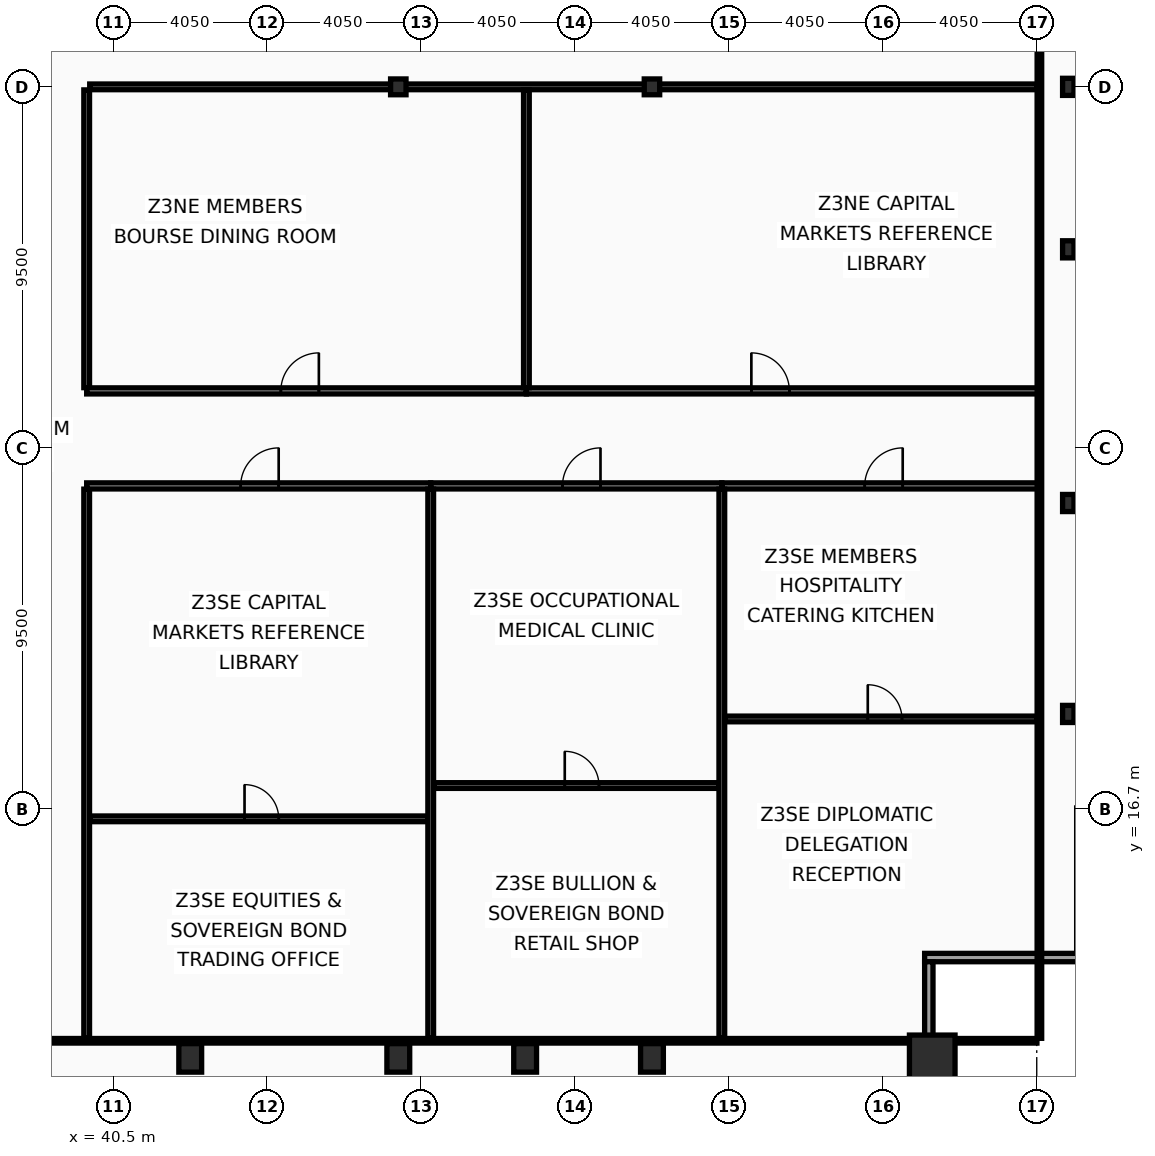
"""IFC4 building model, lengths in metres.
Left out: names, types, materials, properties, quantities, classifications, styles, units other than length and angle.
Written with IfcOpenShell. Run it as: python <this file> out.ifc"""

import sys

from ifc_helpers import new_model, si_unit, direction, frame, frame_2d, origin, origin_2d, place, context, subcontext, project, spatial, rectangle, hollow_rectangle, i_section, extrude, element, fill, save


model = new_model("IFC4")
c1 = context("Model", 3, precision=1e-05, world=origin(), true_north=direction((0.0, 1.0)))
c2 = subcontext(c1, "Body", "Model", "MODEL_VIEW")
j1 = project(units=[si_unit("LENGTHUNIT", "METRE"), si_unit("PLANEANGLEUNIT", "RADIAN")], contexts=[c1])
p1 = place(None, origin())
s1 = spatial("IfcSite", under=j1, at=p1, CompositionType="ELEMENT")
p2 = place(p1, origin())
s2 = spatial("IfcBuilding", under=s1, at=p2, CompositionType="ELEMENT")
p3 = place(p2, frame((0.0, 0.0, 228.2)))
s3 = spatial("IfcBuildingStorey", under=s2, at=p3, CompositionType="ELEMENT", Elevation=228.2)
p4 = place(p3, frame((62.05, 10.15, 0.0), z_axis=(0.0, 0.0, 1.0), x_axis=(1.0, 0.0, 0.0)))
e1 = element("IfcColumn", 1, at=p4, inside=s3, PredefinedType="COLUMN", context=c2, shape_type="SweptSolid", body=[
    extrude(hollow_rectangle(XDim=1.2, YDim=1.2, WallThickness=0.06, at=origin_2d()), origin(), (0.0, 0.0, 1.0), 3.6),
])
for number, where, z_axis, x_axis in (
    (2, (42.525, 10.15, 0.0), (0.0, 0.0, 1.0), (1.0, 0.0, 0.0)),
    (3, (48.0, 10.15, 0.0), (0.0, 0.0, 1.0), (1.0, 0.0, 0.0)),
    (4, (51.337, 10.15, 0.0), (0.0, 0.0, 1.0), (1.0, 0.0, 0.0)),
    (5, (54.675, 10.15, 0.0), (0.0, 0.0, 1.0), (1.0, 0.0, 0.0)),
):
    element("IfcColumn", number, at=place(p3, frame(where, z_axis=z_axis, x_axis=x_axis)), inside=s3, PredefinedType="COLUMN", context=c2, shape_type="SweptSolid", body=[
        extrude(hollow_rectangle(XDim=0.6, YDim=0.75, WallThickness=0.045, at=origin_2d()), origin(), (0.0, 0.0, 1.0), 3.6),
    ])
for number, where, z_axis, x_axis in (
    (6, (65.63, 19.2, 0.0), (0.0, 0.0, 1.0), (1.0, 0.0, 0.0)),
    (7, (65.63, 24.75, 0.0), (0.0, 0.0, 1.0), (1.0, 0.0, 0.0)),
    (8, (65.63, 31.425, 0.0), (0.0, 0.0, 1.0), (1.0, 0.0, 0.0)),
    (9, (65.63, 35.7, 0.0), (0.0, 0.0, 1.0), (1.0, 0.0, 0.0)),
):
    element("IfcColumn", number, at=place(p3, frame(where, z_axis=z_axis, x_axis=x_axis)), inside=s3, PredefinedType="COLUMN", context=c2, shape_type="SweptSolid", body=[
        extrude(i_section(OverallWidth=0.3, OverallDepth=0.45, WebThickness=0.014, FlangeThickness=0.026, at=origin_2d()), origin(), (0.0, 0.0, 1.0), 3.6),
    ])
for number, where, z_axis, x_axis in (
    (10, (48.0, 35.7, 0.0), (0.0, 0.0, 1.0), (1.0, 0.0, 0.0)),
    (11, (54.675, 35.7, 0.0), (0.0, 0.0, 1.0), (1.0, 0.0, 0.0)),
):
    element("IfcColumn", number, at=place(p3, frame(where, z_axis=z_axis, x_axis=x_axis)), inside=s3, PredefinedType="COLUMN", context=c2, shape_type="SweptSolid", body=[
        extrude(i_section(OverallWidth=0.406, OverallDepth=0.416, WebThickness=0.03, FlangeThickness=0.048, at=origin_2d()), origin(), (0.0, 0.0, 1.0), 3.6),
    ])
p5 = place(p3, frame((66.07, 12.79, 0.0), z_axis=(0.0, 0.0, 1.0), x_axis=(-1.0, 0.0, 0.0)))
e12 = element("IfcWall", 12, at=p5, inside=s3, PredefinedType="SOLIDWALL", context=c2, shape_type="SweptSolid", body=[
    extrude(rectangle(XDim=4.22, YDim=0.22, at=frame_2d((2.11, 0.0))), origin(), (0.0, 0.0, 1.0), 2.83),
])
p6 = place(p3, frame((61.96, 12.68, 0.0), z_axis=(0.0, 0.0, 1.0), x_axis=(0.0, -1.0, 0.0)))
e13 = element("IfcWall", 13, at=p6, inside=s3, PredefinedType="SOLIDWALL", context=c2, shape_type="SweptSolid", body=[
    extrude(rectangle(XDim=3.91, YDim=0.22, at=frame_2d((1.955, 0.0))), origin(), (0.0, 0.0, 1.0), 2.83),
])
p7 = place(p3, frame((39.8, 10.665, 0.0), z_axis=(0.0, 0.0, 1.0), x_axis=(0.0, 1.0, 0.0)))
e14 = element("IfcWall", 14, at=p7, inside=s3, PredefinedType="PARTITIONING", context=c2, shape_type="SweptSolid", body=[
    extrude(rectangle(XDim=14.45, YDim=0.15, at=frame_2d((7.225, 0.0))), origin(), (0.0, 0.0, 1.0), 2.98),
])
p8 = place(p3, frame((39.8, 27.785, 0.0), z_axis=(0.0, 0.0, 1.0), x_axis=(0.0, 1.0, 0.0)))
e15 = element("IfcWall", 15, at=p8, inside=s3, PredefinedType="PARTITIONING", context=c2, shape_type="SweptSolid", body=[
    extrude(rectangle(XDim=7.835, YDim=0.15, at=frame_2d((3.917, 0.0))), origin(), (0.0, 0.0, 1.0), 2.98),
])
p9 = place(p3, frame((39.88, 35.7, 0.0), z_axis=(0.0, 0.0, 1.0), x_axis=(1.0, 0.0, 0.0)))
e16 = element("IfcWall", 16, at=p9, inside=s3, PredefinedType="PARTITIONING", context=c2, shape_type="SweptSolid", body=[
    extrude(rectangle(XDim=24.925, YDim=0.15, at=frame_2d((12.462, 0.0))), origin(), (0.0, 0.0, 1.0), 2.78),
])
p10 = place(p3, frame((39.8, 25.2, 0.0), z_axis=(0.0, 0.0, 1.0), x_axis=(1.0, 0.0, 0.0)))
e17 = element("IfcWall", 17, at=p10, inside=s3, PredefinedType="PARTITIONING", context=c2, shape_type="SweptSolid", body=[
    extrude(rectangle(XDim=9.053, YDim=0.16, at=frame_2d((4.526, 0.0))), origin(), (0.0, 0.0, 1.0), 2.78),
])
p11 = place(p10, frame((4.052, 0.0, 0.0)))
e18 = element("IfcOpeningElement", 18, at=p11, cuts=e17, PredefinedType="OPENING", context=c2, shape_type="SweptSolid", body=[
    extrude(rectangle(XDim=1.0, YDim=2.05, at=frame_2d((0.5, 1.025))), frame((0.0, 0.09, 0.0), z_axis=(0.0, -1.0, 0.0), x_axis=(1.0, 0.0, 0.0)), (0.0, 0.0, 1.0), 0.18),
])
p12 = place(p3, frame((39.88, 16.44, 0.0), z_axis=(0.0, 0.0, 1.0), x_axis=(1.0, 0.0, 0.0)))
e19 = element("IfcWall", 19, at=p12, inside=s3, PredefinedType="PARTITIONING", context=c2, shape_type="SweptSolid", body=[
    extrude(rectangle(XDim=8.893, YDim=0.15, at=frame_2d((4.447, 0.0))), origin(), (0.0, 0.0, 1.0), 2.78),
])
p13 = place(p12, frame((4.074, 0.0, 0.0)))
e20 = element("IfcOpeningElement", 20, at=p13, cuts=e19, PredefinedType="OPENING", context=c2, shape_type="SweptSolid", body=[
    extrude(rectangle(XDim=0.9, YDim=2.05, at=frame_2d((0.45, 1.025))), frame((0.0, 0.085, 0.0), z_axis=(0.0, -1.0, 0.0), x_axis=(1.0, 0.0, 0.0)), (0.0, 0.0, 1.0), 0.17),
])
p14 = place(p3, frame((48.853, 25.2, 0.0), z_axis=(0.0, 0.0, 1.0), x_axis=(1.0, 0.0, 0.0)))
e21 = element("IfcWall", 21, at=p14, inside=s3, PredefinedType="PARTITIONING", context=c2, shape_type="SweptSolid", body=[
    extrude(rectangle(XDim=7.66, YDim=0.16, at=frame_2d((3.83, 0.0))), origin(), (0.0, 0.0, 1.0), 2.78),
])
p15 = place(p14, frame((3.467, 0.0, 0.0)))
e22 = element("IfcOpeningElement", 22, at=p15, cuts=e21, PredefinedType="OPENING", context=c2, shape_type="SweptSolid", body=[
    extrude(rectangle(XDim=1.0, YDim=2.05, at=frame_2d((0.5, 1.025))), frame((0.0, 0.09, 0.0), z_axis=(0.0, -1.0, 0.0), x_axis=(1.0, 0.0, 0.0)), (0.0, 0.0, 1.0), 0.18),
])
p16 = place(p3, frame((48.853, 10.665, 0.0), z_axis=(0.0, 0.0, 1.0), x_axis=(0.0, 1.0, 0.0)))
e23 = element("IfcWall", 23, at=p16, inside=s3, PredefinedType="PARTITIONING", context=c2, shape_type="SweptSolid", body=[
    extrude(rectangle(XDim=14.45, YDim=0.15, at=frame_2d((7.225, 0.0))), origin(), (0.0, 0.0, 1.0), 2.98),
])
p17 = place(p3, frame((48.933, 17.316, 0.0), z_axis=(0.0, 0.0, 1.0), x_axis=(1.0, 0.0, 0.0)))
e24 = element("IfcWall", 24, at=p17, inside=s3, PredefinedType="PARTITIONING", context=c2, shape_type="SweptSolid", body=[
    extrude(rectangle(XDim=7.5, YDim=0.15, at=frame_2d((3.75, 0.0))), origin(), (0.0, 0.0, 1.0), 2.78),
])
p18 = place(p17, frame((3.447, 0.0, 0.0)))
e25 = element("IfcOpeningElement", 25, at=p18, cuts=e24, PredefinedType="OPENING", context=c2, shape_type="SweptSolid", body=[
    extrude(rectangle(XDim=0.9, YDim=2.05, at=frame_2d((0.45, 1.025))), frame((0.0, 0.085, 0.0), z_axis=(0.0, -1.0, 0.0), x_axis=(1.0, 0.0, 0.0)), (0.0, 0.0, 1.0), 0.17),
])
p19 = place(p3, frame((56.513, 25.2, 0.0), z_axis=(0.0, 0.0, 1.0), x_axis=(1.0, 0.0, 0.0)))
e26 = element("IfcWall", 26, at=p19, inside=s3, PredefinedType="PARTITIONING", context=c2, shape_type="SweptSolid", body=[
    extrude(rectangle(XDim=8.357, YDim=0.16, at=frame_2d((4.178, 0.0))), origin(), (0.0, 0.0, 1.0), 3.44),
])
p20 = place(p19, frame((3.76, 0.0, 0.0)))
e27 = element("IfcOpeningElement", 27, at=p20, cuts=e26, PredefinedType="OPENING", context=c2, shape_type="SweptSolid", body=[
    extrude(rectangle(XDim=1.0, YDim=2.05, at=frame_2d((0.5, 1.025))), frame((0.0, 0.09, 0.0), z_axis=(0.0, -1.0, 0.0), x_axis=(1.0, 0.0, 0.0)), (0.0, 0.0, 1.0), 0.18),
])
p21 = place(p3, frame((56.513, 10.665, 0.0), z_axis=(0.0, 0.0, 1.0), x_axis=(0.0, 1.0, 0.0)))
e28 = element("IfcWall", 28, at=p21, inside=s3, PredefinedType="PARTITIONING", context=c2, shape_type="SweptSolid", body=[
    extrude(rectangle(XDim=14.45, YDim=0.15, at=frame_2d((7.225, 0.0))), origin(), (0.0, 0.0, 1.0), 2.78),
])
p22 = place(p3, frame((56.593, 19.068, 0.0), z_axis=(0.0, 0.0, 1.0), x_axis=(1.0, 0.0, 0.0)))
e29 = element("IfcWall", 29, at=p22, inside=s3, PredefinedType="PARTITIONING", context=c2, shape_type="SweptSolid", body=[
    extrude(rectangle(XDim=8.212, YDim=0.15, at=frame_2d((4.106, 0.0))), origin(), (0.0, 0.0, 1.0), 2.78),
])
p23 = place(p22, frame((3.76, 0.0, 0.0)))
e30 = element("IfcOpeningElement", 30, at=p23, cuts=e29, PredefinedType="OPENING", context=c2, shape_type="SweptSolid", body=[
    extrude(rectangle(XDim=0.9, YDim=2.05, at=frame_2d((0.45, 1.025))), frame((0.0, 0.085, 0.0), z_axis=(0.0, -1.0, 0.0), x_axis=(1.0, 0.0, 0.0)), (0.0, 0.0, 1.0), 0.17),
])
p24 = place(p3, frame((39.8, 27.7, 0.0), z_axis=(0.0, 0.0, 1.0), x_axis=(1.0, 0.0, 0.0)))
e31 = element("IfcWall", 31, at=p24, inside=s3, PredefinedType="PARTITIONING", context=c2, shape_type="SweptSolid", body=[
    extrude(rectangle(XDim=11.571, YDim=0.16, at=frame_2d((5.785, 0.0))), origin(), (0.0, 0.0, 1.0), 2.78),
])
p25 = place(p24, frame((5.11, 0.0, 0.0)))
e32 = element("IfcOpeningElement", 32, at=p25, cuts=e31, PredefinedType="OPENING", context=c2, shape_type="SweptSolid", body=[
    extrude(rectangle(XDim=1.0, YDim=2.05, at=frame_2d((0.5, 1.025))), frame((0.0, 0.09, 0.0), z_axis=(0.0, -1.0, 0.0), x_axis=(1.0, 0.0, 0.0)), (0.0, 0.0, 1.0), 0.18),
])
p26 = place(p3, frame((51.371, 27.7, 0.0), z_axis=(0.0, 0.0, 1.0), x_axis=(1.0, 0.0, 0.0)))
e33 = element("IfcWall", 33, at=p26, inside=s3, PredefinedType="PARTITIONING", context=c2, shape_type="SweptSolid", body=[
    extrude(rectangle(XDim=13.499, YDim=0.16, at=frame_2d((6.75, 0.0))), origin(), (0.0, 0.0, 1.0), 2.78),
])
p27 = place(p26, frame((5.92, 0.0, 0.0)))
e34 = element("IfcOpeningElement", 34, at=p27, cuts=e33, PredefinedType="OPENING", context=c2, shape_type="SweptSolid", body=[
    extrude(rectangle(XDim=1.0, YDim=2.05, at=frame_2d((0.5, 1.025))), frame((0.0, 0.09, 0.0), z_axis=(0.0, -1.0, 0.0), x_axis=(1.0, 0.0, 0.0)), (0.0, 0.0, 1.0), 0.18),
])
p28 = place(p3, frame((51.371, 27.785, 0.0), z_axis=(0.0, 0.0, 1.0), x_axis=(0.0, 1.0, 0.0)))
e35 = element("IfcWall", 35, at=p28, inside=s3, PredefinedType="PARTITIONING", context=c2, shape_type="SweptSolid", body=[
    extrude(rectangle(XDim=7.835, YDim=0.15, at=frame_2d((3.917, 0.0))), origin(), (0.0, 0.0, 1.0), 2.98),
])
p29 = place(p3, frame((64.87, 10.665, 0.0), z_axis=(0.0, 0.0, 1.0), x_axis=(0.0, 1.0, 0.0)))
e36 = element("IfcWall", 36, at=p29, inside=s3, PredefinedType="PARTITIONING", context=c2, shape_type="SweptSolid", body=[
    extrude(rectangle(XDim=42.11, YDim=0.12, at=frame_2d((21.055, 0.0))), origin(), (0.0, 0.0, 1.0), 2.78),
])
p30 = place(p3, frame((8.095, 10.6, 0.0), z_axis=(0.0, 0.0, 1.0), x_axis=(1.0, 0.0, 0.0)))
e37 = element("IfcWall", 37, at=p30, inside=s3, PredefinedType="PARTITIONING", context=c2, shape_type="SweptSolid", body=[
    extrude(rectangle(XDim=56.71, YDim=0.12, at=frame_2d((28.355, 0.0))), origin(), (0.0, 0.0, 1.0), 2.78),
])
p31 = place(p11, origin())
e38 = element("IfcDoor", 38, at=p31, inside=s3, OperationType="SINGLE_SWING_RIGHT", PredefinedType="DOOR", context=c2, shape_type="SweptSolid", body=[
    extrude(rectangle(XDim=1.0, YDim=2.05, at=frame_2d((0.5, 1.025))), frame((0.0, 0.025, 0.0), z_axis=(0.0, -1.0, 0.0), x_axis=(1.0, 0.0, 0.0)), (0.0, 0.0, 1.0), 0.05),
])
fill(e18, e38)
p32 = place(p13, origin())
e39 = element("IfcDoor", 39, at=p32, inside=s3, OperationType="SINGLE_SWING_LEFT", PredefinedType="DOOR", context=c2, shape_type="SweptSolid", body=[
    extrude(rectangle(XDim=0.9, YDim=2.05, at=frame_2d((0.45, 1.025))), frame((0.0, 0.025, 0.0), z_axis=(0.0, -1.0, 0.0), x_axis=(1.0, 0.0, 0.0)), (0.0, 0.0, 1.0), 0.05),
])
fill(e20, e39)
p33 = place(p15, origin())
e40 = element("IfcDoor", 40, at=p33, inside=s3, OperationType="SINGLE_SWING_RIGHT", PredefinedType="DOOR", context=c2, shape_type="SweptSolid", body=[
    extrude(rectangle(XDim=1.0, YDim=2.05, at=frame_2d((0.5, 1.025))), frame((0.0, 0.025, 0.0), z_axis=(0.0, -1.0, 0.0), x_axis=(1.0, 0.0, 0.0)), (0.0, 0.0, 1.0), 0.05),
])
fill(e22, e40)
p34 = place(p18, origin())
e41 = element("IfcDoor", 41, at=p34, inside=s3, OperationType="SINGLE_SWING_LEFT", PredefinedType="DOOR", context=c2, shape_type="SweptSolid", body=[
    extrude(rectangle(XDim=0.9, YDim=2.05, at=frame_2d((0.45, 1.025))), frame((0.0, 0.025, 0.0), z_axis=(0.0, -1.0, 0.0), x_axis=(1.0, 0.0, 0.0)), (0.0, 0.0, 1.0), 0.05),
])
fill(e25, e41)
p35 = place(p20, origin())
e42 = element("IfcDoor", 42, at=p35, inside=s3, OperationType="SINGLE_SWING_RIGHT", PredefinedType="DOOR", context=c2, shape_type="SweptSolid", body=[
    extrude(rectangle(XDim=1.0, YDim=2.05, at=frame_2d((0.5, 1.025))), frame((0.0, 0.025, 0.0), z_axis=(0.0, -1.0, 0.0), x_axis=(1.0, 0.0, 0.0)), (0.0, 0.0, 1.0), 0.05),
])
fill(e27, e42)
p36 = place(p23, origin())
e43 = element("IfcDoor", 43, at=p36, inside=s3, OperationType="SINGLE_SWING_LEFT", PredefinedType="DOOR", context=c2, shape_type="SweptSolid", body=[
    extrude(rectangle(XDim=0.9, YDim=2.05, at=frame_2d((0.45, 1.025))), frame((0.0, 0.025, 0.0), z_axis=(0.0, -1.0, 0.0), x_axis=(1.0, 0.0, 0.0)), (0.0, 0.0, 1.0), 0.05),
])
fill(e30, e43)
p37 = place(p25, origin())
e44 = element("IfcDoor", 44, at=p37, inside=s3, OperationType="SINGLE_SWING_RIGHT", PredefinedType="DOOR", context=c2, shape_type="SweptSolid", body=[
    extrude(rectangle(XDim=1.0, YDim=2.05, at=frame_2d((0.5, 1.025))), frame((0.0, 0.025, 0.0), z_axis=(0.0, -1.0, 0.0), x_axis=(1.0, 0.0, 0.0)), (0.0, 0.0, 1.0), 0.05),
])
fill(e32, e44)
p38 = place(p27, origin())
e45 = element("IfcDoor", 45, at=p38, inside=s3, OperationType="SINGLE_SWING_LEFT", PredefinedType="DOOR", context=c2, shape_type="SweptSolid", body=[
    extrude(rectangle(XDim=1.0, YDim=2.05, at=frame_2d((0.5, 1.025))), frame((0.0, 0.025, 0.0), z_axis=(0.0, -1.0, 0.0), x_axis=(1.0, 0.0, 0.0)), (0.0, 0.0, 1.0), 0.05),
])
fill(e34, e45)
save(model, sys.argv[1])
